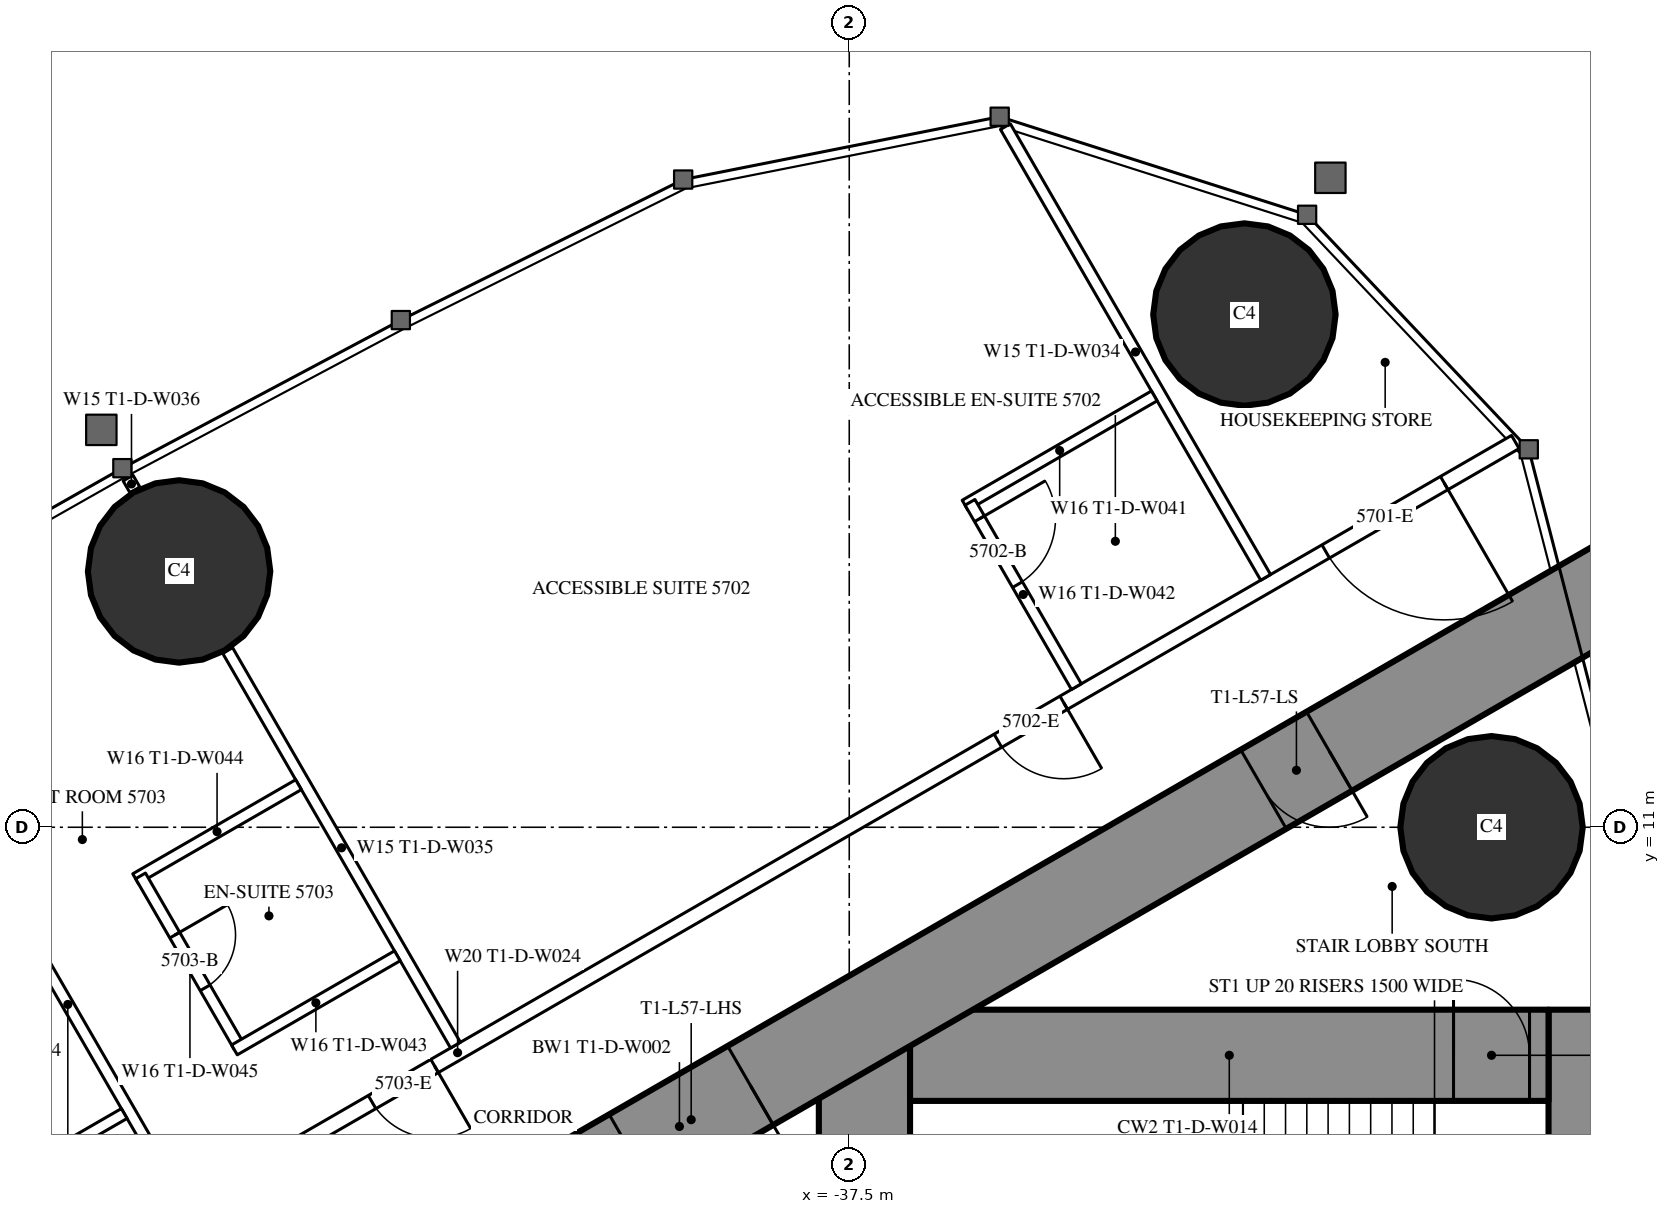
"""IFC4 building model, lengths in metres.
Left out: names, types, materials, properties, quantities, classifications, styles, units other than length and angle.
Written with IfcOpenShell. Run it as: python <this file> out.ifc"""

import sys

from ifc_helpers import new_model, si_unit, direction, frame, frame_2d, origin, origin_2d, place, context, subcontext, project, spatial, rectangle, circle, extrude, element, fill, save


model = new_model("IFC4")
c1 = context("Model", 3, precision=1e-05, world=origin(), true_north=direction((0.0, 1.0)))
c2 = subcontext(c1, "Body", "Model", "MODEL_VIEW")
j1 = project(units=[si_unit("LENGTHUNIT", "METRE"), si_unit("PLANEANGLEUNIT", "RADIAN")], contexts=[c1])
p1 = place(None, origin())
s1 = spatial("IfcSite", under=j1, at=p1, CompositionType="ELEMENT")
p2 = place(p1, origin())
s2 = spatial("IfcBuilding", under=s1, at=p2, CompositionType="ELEMENT")
p3 = place(p2, frame((0.0, 0.0, 215.3)))
s3 = spatial("IfcBuildingStorey", under=s2, at=p3, CompositionType="ELEMENT", Elevation=215.3)
for number, where, z_axis, x_axis in (
    (1, (-32.301, 17.745, 0.0), (0.0, 0.0, 1.0), (1.0, 0.0, 0.0)),
    (2, (-29.05, 11.0, 0.0), (0.0, 0.0, 1.0), (1.0, 0.0, 0.0)),
    (3, (-46.317, 14.365, 0.0), (0.0, 0.0, 1.0), (1.0, 0.0, 0.0)),
):
    element("IfcColumn", number, at=place(p3, frame(where, z_axis=z_axis, x_axis=x_axis)), inside=s3, PredefinedType="COLUMN", context=c2, shape_type="SweptSolid", body=[
        extrude(circle(Radius=1.2, at=origin_2d()), origin(), (0.0, 0.0, 1.0), 3.6),
    ])
p4 = place(p3, frame((-27.9, 8.6, 0.0), z_axis=(0.0, 0.0, 1.0), x_axis=(0.0, -1.0, 0.0)))
e4 = element("IfcWall", 4, at=p4, inside=s3, PredefinedType="SHEAR", context=c2, shape_type="SweptSolid", body=[
    extrude(rectangle(XDim=17.2, YDim=0.8, at=frame_2d((8.6, 0.0))), origin(), (0.0, 0.0, 1.0), 3.6),
])
p5 = place(p4, frame((6.95, 0.0, 0.0)))
e5 = element("IfcOpeningElement", 5, at=p5, cuts=e4, PredefinedType="OPENING", context=c2, shape_type="SweptSolid", body=[
    extrude(rectangle(XDim=0.9, YDim=2.2, at=frame_2d((0.45, 1.1))), frame((0.0, 0.41, 0.0), z_axis=(0.0, -1.0, 0.0), x_axis=(1.0, 0.0, 0.0)), (0.0, 0.0, 1.0), 0.82),
])
p6 = place(p3, frame((-37.3, 8.6, 0.0), z_axis=(0.0, 0.0, 1.0), x_axis=(0.0, -1.0, 0.0)))
e6 = element("IfcWall", 6, at=p6, inside=s3, PredefinedType="SHEAR", context=c2, shape_type="SweptSolid", body=[
    extrude(rectangle(XDim=17.2, YDim=1.2, at=frame_2d((8.6, 0.0))), origin(), (0.0, 0.0, 1.0), 3.6),
])
p7 = place(p6, frame((7.7, 0.0, 0.0)))
e7 = element("IfcOpeningElement", 7, at=p7, cuts=e6, PredefinedType="OPENING", context=c2, shape_type="SweptSolid", body=[
    extrude(rectangle(XDim=1.8, YDim=2.2, at=frame_2d((0.9, 1.1))), frame((0.0, 0.61, 0.0), z_axis=(0.0, -1.0, 0.0), x_axis=(1.0, 0.0, 0.0)), (0.0, 0.0, 1.0), 1.22),
])
p8 = place(p3, frame((-28.3, 8.0, 0.0), z_axis=(0.0, 0.0, 1.0), x_axis=(-1.0, 0.0, 0.0)))
e8 = element("IfcWall", 8, at=p8, inside=s3, PredefinedType="SHEAR", context=c2, shape_type="SweptSolid", body=[
    extrude(rectangle(XDim=8.4, YDim=1.2, at=frame_2d((4.2, 0.0))), origin(), (0.0, 0.0, 1.0), 3.6),
])
p9 = place(p8, frame((0.25, 0.0, 0.0)))
e9 = element("IfcOpeningElement", 9, at=p9, cuts=e8, PredefinedType="OPENING", context=c2, shape_type="SweptSolid", body=[
    extrude(rectangle(XDim=1.0, YDim=2.2, at=frame_2d((0.5, 1.1))), frame((0.0, 0.61, 0.0), z_axis=(0.0, -1.0, 0.0), x_axis=(1.0, 0.0, 0.0)), (0.0, 0.0, 1.0), 1.22),
])
p10 = place(p3, frame((-27.2, 14.3, 0.0), z_axis=(0.0, 0.0, 1.0), x_axis=(-0.866026593062, -0.499997940104, 0.0)))
e10 = element("IfcWall", 10, at=p10, inside=s3, PredefinedType="SHEAR", context=c2, shape_type="SweptSolid", body=[
    extrude(rectangle(XDim=28.946, YDim=1.2, at=frame_2d((14.473, 0.0))), origin(), (0.0, 0.0, 1.0), 3.6),
])
p11 = place(p10, frame((4.6, 0.0, 0.0)))
e11 = element("IfcOpeningElement", 11, at=p11, cuts=e10, PredefinedType="OPENING", context=c2, shape_type="SweptSolid", body=[
    extrude(rectangle(XDim=1.0, YDim=2.2, at=frame_2d((0.5, 1.1))), frame((0.0, 0.61, 0.0), z_axis=(0.0, -1.0, 0.0), x_axis=(1.0, 0.0, 0.0)), (0.0, 0.0, 1.0), 1.22),
])
p12 = place(p10, frame((13.395, 0.0, 0.0)))
e12 = element("IfcOpeningElement", 12, at=p12, cuts=e10, PredefinedType="OPENING", context=c2, shape_type="SweptSolid", body=[
    extrude(rectangle(XDim=1.8, YDim=2.2, at=frame_2d((0.9, 1.1))), frame((0.0, 0.61, 0.0), z_axis=(0.0, -1.0, 0.0), x_axis=(1.0, 0.0, 0.0)), (0.0, 0.0, 1.0), 1.22),
])
p13 = place(p3, frame((-28.737, 16.068, 0.0), z_axis=(0.0, 0.0, 1.0), x_axis=(-0.866026057212, -0.499998868229, 0.0)))
e13 = element("IfcWall", 13, at=p13, inside=s3, PredefinedType="PARTITIONING", context=c2, shape_type="SweptSolid", body=[
    extrude(rectangle(XDim=32.137, YDim=0.2, at=frame_2d((16.068, 0.0))), origin(), (0.0, 0.0, 1.0), 3.35),
])
p14 = place(p13, frame((1.08, 0.0, 0.0)))
e14 = element("IfcOpeningElement", 14, at=p14, cuts=e13, PredefinedType="OPENING", context=c2, shape_type="SweptSolid", body=[
    extrude(rectangle(XDim=1.8, YDim=2.03, at=frame_2d((0.9, 1.015))), frame((0.0, 0.11, 0.0), z_axis=(0.0, -1.0, 0.0), x_axis=(1.0, 0.0, 0.0)), (0.0, 0.0, 1.0), 0.22),
])
p15 = place(p13, frame((6.86, 0.0, 0.0)))
e15 = element("IfcOpeningElement", 15, at=p15, cuts=e13, PredefinedType="OPENING", context=c2, shape_type="SweptSolid", body=[
    extrude(rectangle(XDim=1.0, YDim=2.2, at=frame_2d((0.5, 1.1))), frame((0.0, 0.11, 0.0), z_axis=(0.0, -1.0, 0.0), x_axis=(1.0, 0.0, 0.0)), (0.0, 0.0, 1.0), 0.22),
])
p16 = place(p13, frame((16.418, 0.0, 0.0)))
e16 = element("IfcOpeningElement", 16, at=p16, cuts=e13, PredefinedType="OPENING", context=c2, shape_type="SweptSolid", body=[
    extrude(rectangle(XDim=0.95, YDim=2.2, at=frame_2d((0.475, 1.1))), frame((0.0, 0.11, 0.0), z_axis=(0.0, -1.0, 0.0), x_axis=(1.0, 0.0, 0.0)), (0.0, 0.0, 1.0), 0.22),
])
p17 = place(p13, frame((20.567, 0.0, 0.0)))
e17 = element("IfcOpeningElement", 17, at=p17, cuts=e13, PredefinedType="OPENING", context=c2, shape_type="SweptSolid", body=[
    extrude(rectangle(XDim=0.95, YDim=2.2, at=frame_2d((0.475, 1.1))), frame((0.0, 0.11, 0.0), z_axis=(0.0, -1.0, 0.0), x_axis=(1.0, 0.0, 0.0)), (0.0, 0.0, 1.0), 0.22),
])
p18 = place(p13, frame((27.065, 0.0, 0.0)))
e18 = element("IfcOpeningElement", 18, at=p18, cuts=e13, PredefinedType="OPENING", context=c2, shape_type="SweptSolid", body=[
    extrude(rectangle(XDim=0.95, YDim=2.2, at=frame_2d((0.475, 1.1))), frame((0.0, 0.11, 0.0), z_axis=(0.0, -1.0, 0.0), x_axis=(1.0, 0.0, 0.0)), (0.0, 0.0, 1.0), 0.22),
])
p19 = place(p3, frame((-32.022, 14.287, 0.0), z_axis=(0.0, 0.0, 1.0), x_axis=(-0.50000019414, 0.866025291697, 0.0)))
e19 = element("IfcWall", 19, at=p19, inside=s3, PredefinedType="PARTITIONING", context=c2, shape_type="SweptSolid", body=[
    extrude(rectangle(XDim=6.848, YDim=0.15, at=frame_2d((3.424, 0.0))), origin(), (0.0, 0.0, 1.0), 3.35),
])
p20 = place(p3, frame((-42.68, 8.134, 0.0), z_axis=(0.0, 0.0, 1.0), x_axis=(-0.499984479505, 0.866034364361, 0.0)))
e20 = element("IfcWall", 20, at=p20, inside=s3, PredefinedType="PARTITIONING", context=c2, shape_type="SweptSolid", body=[
    extrude(rectangle(XDim=5.995, YDim=0.15, at=frame_2d((2.998, 0.0))), origin(), (0.0, 0.0, 1.0), 2.45),
])
p21 = place(p3, frame((-46.898, 15.439, 0.0), z_axis=(0.0, 0.0, 1.0), x_axis=(-0.500232303069, 0.865891241997, 0.0)))
e21 = element("IfcWall", 21, at=p21, inside=s3, PredefinedType="PARTITIONING", context=c2, shape_type="SweptSolid", body=[
    extrude(rectangle(XDim=0.18, YDim=0.15, at=frame_2d((0.09, 0.0))), origin(), (0.0, 0.0, 1.0), 2.45),
])
p22 = place(p3, frame((-46.274, 6.059, 0.0), z_axis=(0.0, 0.0, 1.0), x_axis=(-0.500020471368, 0.866013584312, 0.0)))
e22 = element("IfcWall", 22, at=p22, inside=s3, PredefinedType="PARTITIONING", context=c2, shape_type="SweptSolid", body=[
    extrude(rectangle(XDim=6.028, YDim=0.15, at=frame_2d((3.014, 0.0))), origin(), (0.0, 0.0, 1.0), 2.45),
])
p23 = place(p3, frame((-33.487, 16.675, 0.0), z_axis=(0.0, 0.0, 1.0), x_axis=(-0.866039941686, -0.499974818771, 0.0)))
e23 = element("IfcWall", 23, at=p23, inside=s3, PredefinedType="PARTITIONING", context=c2, shape_type="SweptSolid", body=[
    extrude(rectangle(XDim=2.875, YDim=0.15, at=frame_2d((1.438, 0.0))), origin(), (0.0, 0.0, 1.0), 3.35),
])
p24 = place(p3, frame((-34.511, 12.85, 0.0), z_axis=(0.0, 0.0, 1.0), x_axis=(-0.500011755427, 0.866018616679, 0.0)))
e24 = element("IfcWall", 24, at=p24, inside=s3, PredefinedType="PARTITIONING", context=c2, shape_type="SweptSolid", body=[
    extrude(rectangle(XDim=2.8, YDim=0.15, at=frame_2d((1.4, 0.0))), origin(), (0.0, 0.0, 1.0), 3.35),
])
p25 = place(p24, frame((1.55, 0.0, 0.0)))
e25 = element("IfcOpeningElement", 25, at=p25, cuts=e24, PredefinedType="OPENING", context=c2, shape_type="SweptSolid", body=[
    extrude(rectangle(XDim=1.0, YDim=2.2, at=frame_2d((0.5, 1.1))), frame((0.0, 0.085, 0.0), z_axis=(0.0, -1.0, 0.0), x_axis=(1.0, 0.0, 0.0)), (0.0, 0.0, 1.0), 0.17),
])
p26 = place(p3, frame((-44.745, 11.56, 0.0), z_axis=(0.0, 0.0, 1.0), x_axis=(-0.866006523861, -0.500032699561, 0.0)))
e26 = element("IfcWall", 26, at=p26, inside=s3, PredefinedType="PARTITIONING", context=c2, shape_type="SweptSolid", body=[
    extrude(rectangle(XDim=2.475, YDim=0.15, at=frame_2d((1.237, 0.0))), origin(), (0.0, 0.0, 1.0), 3.35),
])
p27 = place(p3, frame((-45.524, 8.109, 0.0), z_axis=(0.0, 0.0, 1.0), x_axis=(-0.49997716683, 0.86603858612, 0.0)))
e27 = element("IfcWall", 27, at=p27, inside=s3, PredefinedType="PARTITIONING", context=c2, shape_type="SweptSolid", body=[
    extrude(rectangle(XDim=2.6, YDim=0.15, at=frame_2d((1.3, 0.0))), origin(), (0.0, 0.0, 1.0), 3.35),
])
p28 = place(p27, frame((0.9, 0.0, 0.0)))
e28 = element("IfcOpeningElement", 28, at=p28, cuts=e27, PredefinedType="OPENING", context=c2, shape_type="SweptSolid", body=[
    extrude(rectangle(XDim=0.8, YDim=2.2, at=frame_2d((0.4, 1.1))), frame((0.0, 0.085, 0.0), z_axis=(0.0, -1.0, 0.0), x_axis=(1.0, 0.0, 0.0)), (0.0, 0.0, 1.0), 0.17),
])
for number, where, z_axis, x_axis in (
    (29, (-43.445, 9.309, 0.0), (0.0, 0.0, 1.0), (-0.866, -0.5, 0.0)),
    (30, (-47.039, 7.234, 0.0), (0.0, 0.0, 1.0), (-0.866, -0.5, 0.0)),
):
    element("IfcWall", number, at=place(p3, frame(where, z_axis=z_axis, x_axis=x_axis)), inside=s3, PredefinedType="PARTITIONING", context=c2, shape_type="SweptSolid", body=[
        extrude(rectangle(XDim=2.475, YDim=0.15, at=frame_2d((1.238, 0.0))), origin(), (0.0, 0.0, 1.0), 3.35),
    ])
p29 = place(p14, origin())
e31 = element("IfcDoor", 31, at=p29, inside=s3, OperationType="DOUBLE_DOOR_SINGLE_SWING", PredefinedType="DOOR", context=c2, shape_type="SweptSolid", body=[
    extrude(rectangle(XDim=1.8, YDim=2.03, at=frame_2d((0.9, 1.015))), frame((0.0, 0.025, 0.0), z_axis=(0.0, -1.0, 0.0), x_axis=(1.0, 0.0, 0.0)), (0.0, 0.0, 1.0), 0.05),
])
fill(e14, e31)
p30 = place(p25, origin())
e32 = element("IfcDoor", 32, at=p30, inside=s3, OperationType="SINGLE_SWING_RIGHT", PredefinedType="DOOR", context=c2, shape_type="SweptSolid", body=[
    extrude(rectangle(XDim=1.0, YDim=2.2, at=frame_2d((0.5, 1.1))), frame((0.0, 0.025, 0.0), z_axis=(0.0, -1.0, 0.0), x_axis=(1.0, 0.0, 0.0)), (0.0, 0.0, 1.0), 0.05),
])
fill(e25, e32)
p31 = place(p15, origin())
e33 = element("IfcDoor", 33, at=p31, inside=s3, OperationType="SINGLE_SWING_LEFT", PredefinedType="DOOR", context=c2, shape_type="SweptSolid", body=[
    extrude(rectangle(XDim=1.0, YDim=2.2, at=frame_2d((0.5, 1.1))), frame((0.0, 0.025, 0.0), z_axis=(0.0, -1.0, 0.0), x_axis=(1.0, 0.0, 0.0)), (0.0, 0.0, 1.0), 0.05),
])
fill(e15, e33)
p32 = place(p28, origin())
e34 = element("IfcDoor", 34, at=p32, inside=s3, OperationType="SINGLE_SWING_RIGHT", PredefinedType="DOOR", context=c2, shape_type="SweptSolid", body=[
    extrude(rectangle(XDim=0.8, YDim=2.2, at=frame_2d((0.4, 1.1))), frame((0.0, 0.025, 0.0), z_axis=(0.0, -1.0, 0.0), x_axis=(1.0, 0.0, 0.0)), (0.0, 0.0, 1.0), 0.05),
])
fill(e28, e34)
p33 = place(p16, origin())
e35 = element("IfcDoor", 35, at=p33, inside=s3, OperationType="SINGLE_SWING_LEFT", PredefinedType="DOOR", context=c2, shape_type="SweptSolid", body=[
    extrude(rectangle(XDim=0.95, YDim=2.2, at=frame_2d((0.475, 1.1))), frame((0.0, 0.025, 0.0), z_axis=(0.0, -1.0, 0.0), x_axis=(1.0, 0.0, 0.0)), (0.0, 0.0, 1.0), 0.05),
])
fill(e16, e35)
p34 = place(p11, origin())
e36 = element("IfcDoor", 36, at=p34, inside=s3, OperationType="SINGLE_SWING_LEFT", PredefinedType="DOOR", context=c2, shape_type="SweptSolid", body=[
    extrude(rectangle(XDim=1.0, YDim=2.2, at=frame_2d((0.5, 1.1))), frame((0.0, 0.025, 0.0), z_axis=(0.0, -1.0, 0.0), x_axis=(1.0, 0.0, 0.0)), (0.0, 0.0, 1.0), 0.05),
])
fill(e11, e36)
p35 = place(p12, origin())
e37 = element("IfcDoor", 37, at=p35, inside=s3, OperationType="DOUBLE_DOOR_SINGLE_SWING", PredefinedType="DOOR", context=c2, shape_type="SweptSolid", body=[
    extrude(rectangle(XDim=1.8, YDim=2.2, at=frame_2d((0.9, 1.1))), frame((0.0, 0.025, 0.0), z_axis=(0.0, -1.0, 0.0), x_axis=(1.0, 0.0, 0.0)), (0.0, 0.0, 1.0), 0.05),
])
fill(e12, e37)
p36 = place(p9, origin())
e38 = element("IfcDoor", 38, at=p36, inside=s3, OperationType="SINGLE_SWING_RIGHT", PredefinedType="DOOR", context=c2, shape_type="SweptSolid", body=[
    extrude(rectangle(XDim=1.0, YDim=2.2, at=frame_2d((0.5, 1.1))), frame((0.0, 0.025, 0.0), z_axis=(0.0, -1.0, 0.0), x_axis=(1.0, 0.0, 0.0)), (0.0, 0.0, 1.0), 0.05),
])
fill(e9, e38)
save(model, sys.argv[1])
